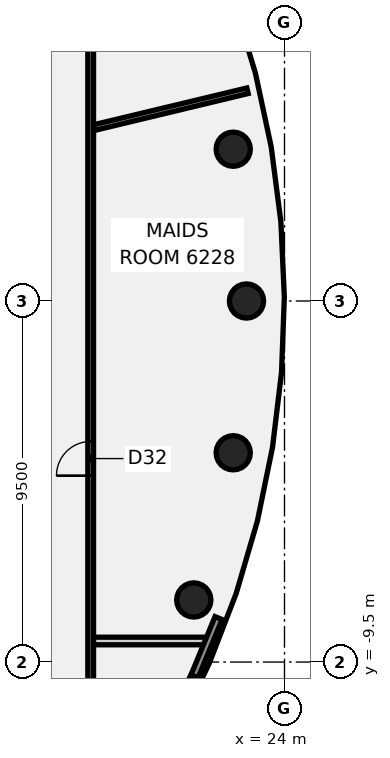
"""IFC4 building model, lengths in metres.
Left out: names, types, materials, properties, quantities, classifications, styles, units other than length and angle.
Written with IfcOpenShell. Run it as: python <this file> out.ifc"""

import sys

from ifc_helpers import new_model, si_unit, direction, frame, frame_2d, origin, origin_2d, place, context, subcontext, project, spatial, rectangle, circle, extrude, element, fill, save


model = new_model("IFC4")
c1 = context("Model", 3, precision=1e-05, world=origin(), true_north=direction((0.0, 1.0)))
c2 = subcontext(c1, "Body", "Model", "MODEL_VIEW")
j1 = project(units=[si_unit("LENGTHUNIT", "METRE"), si_unit("PLANEANGLEUNIT", "RADIAN")], contexts=[c1])
p1 = place(None, origin())
s1 = spatial("IfcSite", under=j1, at=p1, CompositionType="ELEMENT")
p2 = place(p1, origin())
s2 = spatial("IfcBuilding", under=s1, at=p2, CompositionType="ELEMENT")
p3 = place(p2, frame((0.0, 0.0, 245.1)))
s3 = spatial("IfcBuildingStorey", under=s2, at=p3, CompositionType="ELEMENT", Elevation=245.1)
for number, where, z_axis, x_axis in (
    (1, (23.0, 0.0, -0.14), (0.0, 0.0, 1.0), (1.0, 0.0, 0.0)),
    (2, (22.651, 3.994, -0.14), (0.0, 0.0, 1.0), (1.0, 0.0, 0.0)),
    (3, (21.613, -7.866, -0.14), (0.0, 0.0, 1.0), (1.0, 0.0, 0.0)),
    (4, (22.651, -3.994, -0.14), (0.0, 0.0, 1.0), (1.0, 0.0, 0.0)),
):
    element("IfcColumn", number, at=place(p3, frame(where, z_axis=z_axis, x_axis=x_axis)), inside=s3, PredefinedType="COLUMN", context=c2, shape_type="SweptSolid", body=[
        extrude(circle(Radius=0.45, at=origin_2d()), origin(), (0.0, 0.0, 1.0), 3.6),
    ])
p4 = place(p3, frame((18.955, -8.946, 0.0), z_axis=(0.0, 0.0, 1.0), x_axis=(1.0, 0.0, 0.0)))
e5 = element("IfcWall", 5, at=p4, inside=s3, PredefinedType="PARTITIONING", context=c2, shape_type="SweptSolid", body=[
    extrude(rectangle(XDim=2.969, YDim=0.2, at=frame_2d((1.485, 0.0))), origin(), (0.0, 0.0, 1.0), 2.864),
])
p5 = place(p3, frame((18.973, 4.559, 0.0), z_axis=(0.0, 0.0, 1.0), x_axis=(0.972373479146, 0.233430540103, 0.0)))
e6 = element("IfcWall", 6, at=p5, inside=s3, PredefinedType="PARTITIONING", context=c2, shape_type="SweptSolid", body=[
    extrude(rectangle(XDim=4.169, YDim=0.15, at=frame_2d((2.084, 0.0))), origin(), (0.0, 0.0, 1.0), 2.864),
])
p6 = place(p3, frame((18.9, -10.1, 0.0), z_axis=(0.0, 0.0, 1.0), x_axis=(0.0, 1.0, 0.0)))
e7 = element("IfcWall", 7, at=p6, inside=s3, PredefinedType="PARTITIONING", context=c2, shape_type="SweptSolid", body=[
    extrude(rectangle(XDim=20.2, YDim=0.15, at=frame_2d((10.1, 0.0))), origin(), (0.0, 0.0, 1.0), 2.864),
])
p7 = place(p6, frame((5.504, 0.0, 0.0)))
e8 = element("IfcOpeningElement", 8, at=p7, cuts=e7, PredefinedType="OPENING", context=c2, shape_type="SweptSolid", body=[
    extrude(rectangle(XDim=0.9, YDim=2.1, at=frame_2d((0.45, 1.05))), frame((0.0, 0.085, 0.0), z_axis=(0.0, -1.0, 0.0), x_axis=(1.0, 0.0, 0.0)), (0.0, 0.0, 1.0), 0.17),
])
p8 = place(p3, frame((21.631, -9.881, 0.0), z_axis=(0.0, 0.0, 1.0), x_axis=(0.380860529155, 0.924632498527, 0.0)))
e9 = element("IfcWall", 9, at=p8, inside=s3, PredefinedType="SOLIDWALL", context=c2, shape_type="SweptSolid", body=[
    extrude(rectangle(XDim=1.664, YDim=0.2, at=frame_2d((0.832, 0.0))), origin(), (0.0, 0.0, 1.0), 3.46),
])
p9 = place(p3, frame((20.928, -11.317, 0.0), z_axis=(0.0, 0.0, 1.0), x_axis=(0.439689088119, 0.898150046367, 0.0)))
e10 = element("IfcWall", 10, at=p9, inside=s3, PredefinedType="SOLIDWALL", context=c2, shape_type="SweptSolid", body=[
    extrude(rectangle(XDim=1.6, YDim=0.2, at=frame_2d((0.8, 0.0))), origin(), (0.0, 0.0, 1.0), 3.46),
])
p10 = place(p9, frame((0.3, 0.0, 0.0)))
e11 = element("IfcOpeningElement", 11, at=p10, cuts=e10, PredefinedType="OPENING", context=c2, shape_type="SweptSolid", body=[
    extrude(rectangle(XDim=1.0, YDim=2.4, at=frame_2d((0.5, 1.2))), frame((0.0, 0.11, 0.0), z_axis=(0.0, -1.0, 0.0), x_axis=(1.0, 0.0, 0.0)), (0.0, 0.0, 1.0), 0.22),
])
p11 = place(p7, frame((0.9, 0.0, 0.0), z_axis=(0.0, 0.0, 1.0), x_axis=(-1.0, 0.0, 0.0)))
e12 = element("IfcDoor", 12, at=p11, inside=s3, OperationType="SINGLE_SWING_LEFT", PredefinedType="DOOR", context=c2, shape_type="SweptSolid", body=[
    extrude(rectangle(XDim=0.9, YDim=2.1, at=frame_2d((0.45, 1.05))), frame((0.0, 0.025, 0.0), z_axis=(0.0, -1.0, 0.0), x_axis=(1.0, 0.0, 0.0)), (0.0, 0.0, 1.0), 0.05),
])
fill(e8, e12)
save(model, sys.argv[1])
